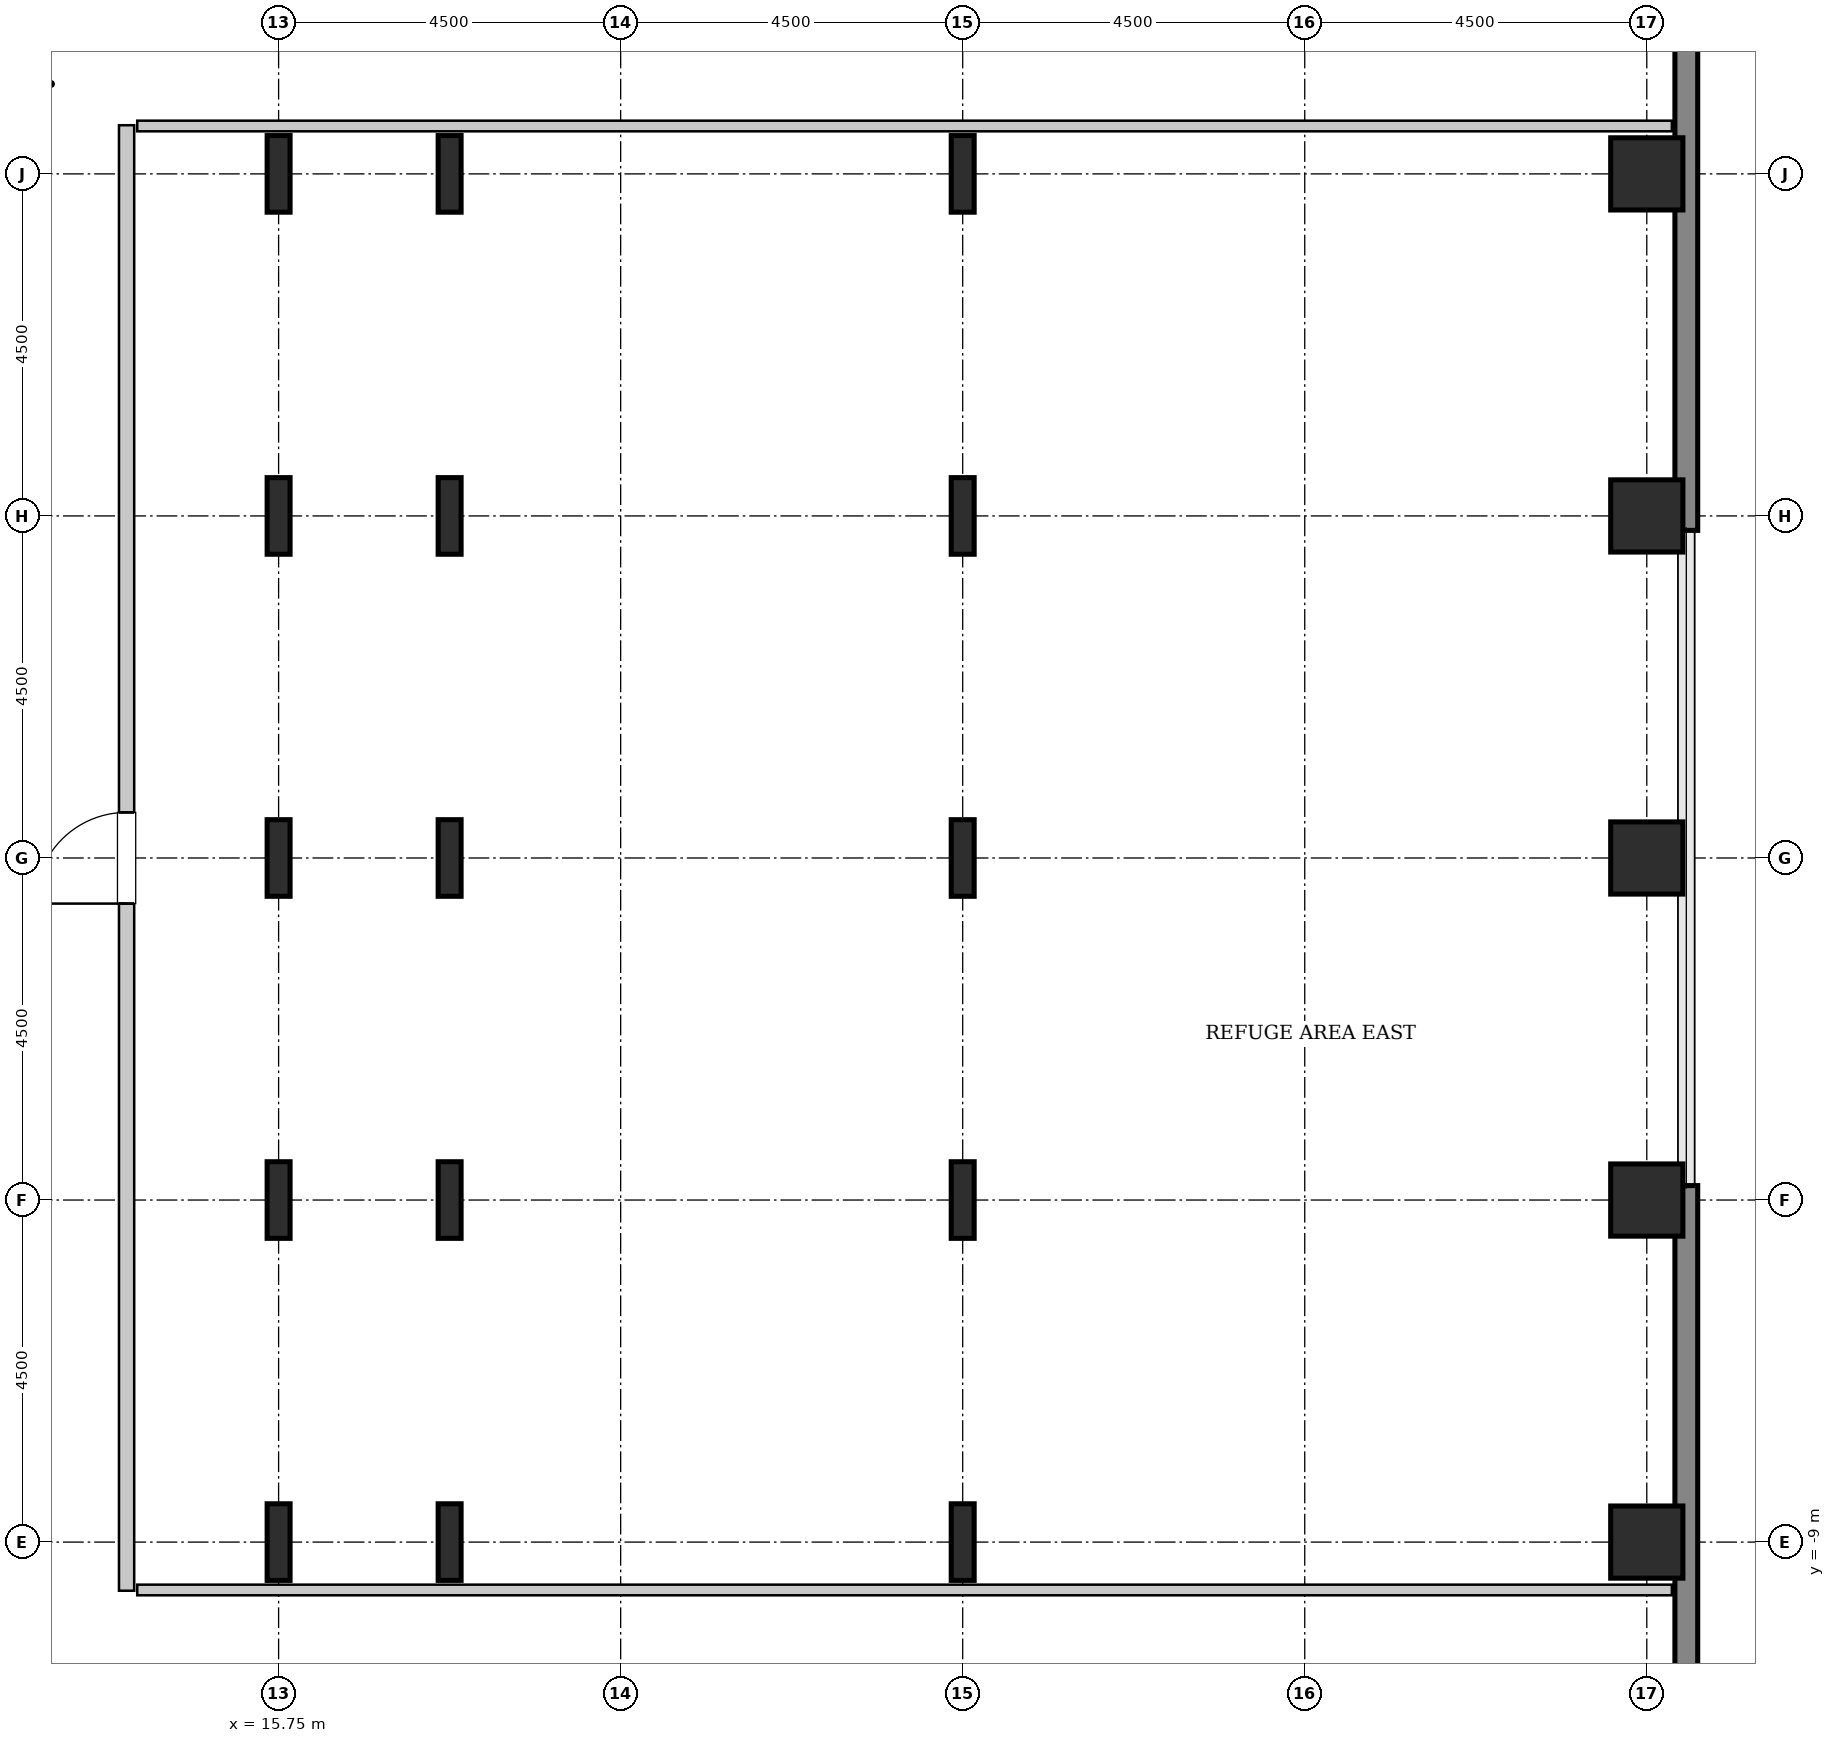
"""IFC4 building model, lengths in metres.
Left out: names, types, materials, properties, quantities, classifications, styles, units other than length and angle.
Written with IfcOpenShell. Run it as: python <this file> out.ifc"""

import sys

from ifc_helpers import new_model, si_unit, direction, frame, frame_2d, origin, origin_2d, place, context, subcontext, project, spatial, rectangle, hollow_rectangle, i_section, extrude, source, transform, mapped, element, fill, save


model = new_model("IFC4")
c1 = context("Model", 3, precision=1e-05, world=origin(), true_north=direction((0.0, 1.0)))
c2 = subcontext(c1, "Body", "Model", "MODEL_VIEW")
j1 = project(units=[si_unit("LENGTHUNIT", "METRE"), si_unit("PLANEANGLEUNIT", "RADIAN")], contexts=[c1])
p1 = place(None, origin())
s1 = spatial("IfcSite", under=j1, at=p1, CompositionType="ELEMENT")
p2 = place(p1, origin())
s2 = spatial("IfcBuilding", under=s1, at=p2, CompositionType="ELEMENT")
p3 = place(p2, frame((0.0, 0.0, 86.2)))
s3 = spatial("IfcBuildingStorey", under=s2, at=p3, CompositionType="ELEMENT", Elevation=86.2)
m1 = source(origin(), c2, "Body", "SweptSolid", [
    extrude(i_section(OverallWidth=0.302, OverallDepth=1.008, WebThickness=0.021, FlangeThickness=0.04, FilletRadius=0.03, at=origin_2d()), origin(), (0.0, 0.0, 1.0), 4.6),
])
for number, where, z_axis, x_axis in (
    (1, (15.75, -9.0, 0.0), (0.0, 0.0, 1.0), (1.0, 0.0, 0.0)),
    (2, (15.75, -4.5, 0.0), (0.0, 0.0, 1.0), (1.0, 0.0, 0.0)),
    (3, (15.75, 0.0, 0.0), (0.0, 0.0, 1.0), (1.0, 0.0, 0.0)),
    (4, (15.75, 4.5, 0.0), (0.0, 0.0, 1.0), (1.0, 0.0, 0.0)),
    (5, (15.75, 9.0, 0.0), (0.0, 0.0, 1.0), (1.0, 0.0, 0.0)),
    (6, (18.0, -9.0, 0.0), (0.0, 0.0, 1.0), (1.0, 0.0, 0.0)),
    (7, (18.0, -4.5, 0.0), (0.0, 0.0, 1.0), (1.0, 0.0, 0.0)),
    (8, (18.0, 0.0, 0.0), (0.0, 0.0, 1.0), (1.0, 0.0, 0.0)),
    (9, (18.0, 4.5, 0.0), (0.0, 0.0, 1.0), (1.0, 0.0, 0.0)),
    (10, (18.0, 9.0, 0.0), (0.0, 0.0, 1.0), (1.0, 0.0, 0.0)),
    (11, (24.75, -9.0, 0.0), (0.0, 0.0, 1.0), (1.0, 0.0, 0.0)),
    (12, (24.75, -4.5, 0.0), (0.0, 0.0, 1.0), (1.0, 0.0, 0.0)),
    (13, (24.75, 0.0, 0.0), (0.0, 0.0, 1.0), (1.0, 0.0, 0.0)),
    (14, (24.75, 4.5, 0.0), (0.0, 0.0, 1.0), (1.0, 0.0, 0.0)),
    (15, (24.75, 9.0, 0.0), (0.0, 0.0, 1.0), (1.0, 0.0, 0.0)),
):
    element("IfcColumn", number, at=place(p3, frame(where, z_axis=z_axis, x_axis=x_axis)), inside=s3, PredefinedType="COLUMN", context=c2, shape_type="MappedRepresentation", body=[
        mapped(m1, transform((0.0, 0.0, 0.0), x_axis=(1.0, 0.0, 0.0), y_axis=(0.0, 1.0, 0.0), z_axis=(0.0, 0.0, 1.0), scale=1.0)),
    ])
m2 = source(origin(), c2, "Body", "SweptSolid", [
    extrude(hollow_rectangle(XDim=0.95, YDim=0.95, WallThickness=0.045, InnerFilletRadius=0.045, OuterFilletRadius=0.09, at=origin_2d()), origin(), (0.0, 0.0, 1.0), 4.6),
])
for number, where, z_axis, x_axis in (
    (16, (33.75, -9.0, 0.0), (0.0, 0.0, 1.0), (1.0, 0.0, 0.0)),
    (17, (33.75, -4.5, 0.0), (0.0, 0.0, 1.0), (1.0, 0.0, 0.0)),
    (18, (33.75, 0.0, 0.0), (0.0, 0.0, 1.0), (1.0, 0.0, 0.0)),
    (19, (33.75, 4.5, 0.0), (0.0, 0.0, 1.0), (1.0, 0.0, 0.0)),
    (20, (33.75, 9.0, 0.0), (0.0, 0.0, 1.0), (1.0, 0.0, 0.0)),
):
    element("IfcColumn", number, at=place(p3, frame(where, z_axis=z_axis, x_axis=x_axis)), inside=s3, PredefinedType="COLUMN", context=c2, shape_type="MappedRepresentation", body=[
        mapped(m2, transform((0.0, 0.0, 0.0), x_axis=(1.0, 0.0, 0.0), y_axis=(0.0, 1.0, 0.0), z_axis=(0.0, 0.0, 1.0), scale=1.0)),
    ])
m3 = source(origin(), c2, "Body", "SweptSolid", [
    extrude(rectangle(XDim=9.38, YDim=0.3, at=frame_2d((4.69, 0.0))), origin(), (0.0, 0.0, 1.0), 4.35),
])
for number, where, z_axis, x_axis in (
    (21, (34.27, -13.69, 0.0), (0.0, 0.0, 1.0), (0.0, 1.0, 0.0)),
    (22, (34.27, 4.31, 0.0), (0.0, 0.0, 1.0), (0.0, 1.0, 0.0)),
):
    element("IfcWall", number, at=place(p3, frame(where, z_axis=z_axis, x_axis=x_axis)), inside=s3, PredefinedType="SHEAR", context=c2, shape_type="MappedRepresentation", body=[
        mapped(m3, transform((0.0, 0.0, 0.0), x_axis=(1.0, 0.0, 0.0), y_axis=(0.0, 1.0, 0.0), z_axis=(0.0, 0.0, 1.0), scale=1.0)),
    ])
m4 = source(origin(), c2, "Body", "SweptSolid", [
    extrude(rectangle(XDim=19.28, YDim=0.2, at=frame_2d((9.64, 0.0))), origin(), (0.0, 0.0, 1.0), 4.335),
])
p4 = place(p3, frame((13.75, -9.64, 0.0), z_axis=(0.0, 0.0, 1.0), x_axis=(0.0, 1.0, 0.0)))
e23 = element("IfcWall", 23, at=p4, inside=s3, PredefinedType="SOLIDWALL", context=c2, shape_type="MappedRepresentation", body=[
    mapped(m4, transform((0.0, 0.0, 0.0), x_axis=(1.0, 0.0, 0.0), y_axis=(0.0, 1.0, 0.0), z_axis=(0.0, 0.0, 1.0), scale=1.0)),
])
p5 = place(p4, frame((9.04, 0.0, 0.0)))
e24 = element("IfcOpeningElement", 24, at=p5, cuts=e23, PredefinedType="OPENING", context=c2, shape_type="SweptSolid", body=[
    extrude(rectangle(XDim=1.2, YDim=2.15, at=frame_2d((0.6, 1.075))), frame((0.0, 0.11, 0.0), z_axis=(0.0, -1.0, 0.0), x_axis=(1.0, 0.0, 0.0)), (0.0, 0.0, 1.0), 0.22),
])
m5 = source(origin(), c2, "Body", "SweptSolid", [
    extrude(rectangle(XDim=20.19, YDim=0.14, at=frame_2d((10.095, 0.0))), origin(), (0.0, 0.0, 1.0), 4.335),
])
for number, where, z_axis, x_axis in (
    (25, (13.89, 9.63, 0.0), (0.0, 0.0, 1.0), (1.0, 0.0, 0.0)),
    (26, (13.89, -9.63, 0.0), (0.0, 0.0, 1.0), (1.0, 0.0, 0.0)),
):
    element("IfcWall", number, at=place(p3, frame(where, z_axis=z_axis, x_axis=x_axis)), inside=s3, PredefinedType="PARTITIONING", context=c2, shape_type="MappedRepresentation", body=[
        mapped(m5, transform((0.0, 0.0, 0.0), x_axis=(1.0, 0.0, 0.0), y_axis=(0.0, 1.0, 0.0), z_axis=(0.0, 0.0, 1.0), scale=1.0)),
    ])
m6 = source(origin(), c2, "Body", "SweptSolid", [
    extrude(rectangle(XDim=1.2, YDim=2.15, at=frame_2d((0.6, 1.075))), frame((0.0, 0.025, 0.0), z_axis=(0.0, -1.0, 0.0), x_axis=(1.0, 0.0, 0.0)), (0.0, 0.0, 1.0), 0.05),
])
p6 = place(p5, origin())
e27 = element("IfcDoor", 27, at=p6, inside=s3, OperationType="SINGLE_SWING_LEFT", PredefinedType="DOOR", context=c2, shape_type="MappedRepresentation", body=[
    mapped(m6, transform((0.0, 0.0, 0.0), x_axis=(1.0, 0.0, 0.0), y_axis=(0.0, 1.0, 0.0), z_axis=(0.0, 0.0, 1.0), scale=1.0)),
])
fill(e24, e27)
save(model, sys.argv[1])
